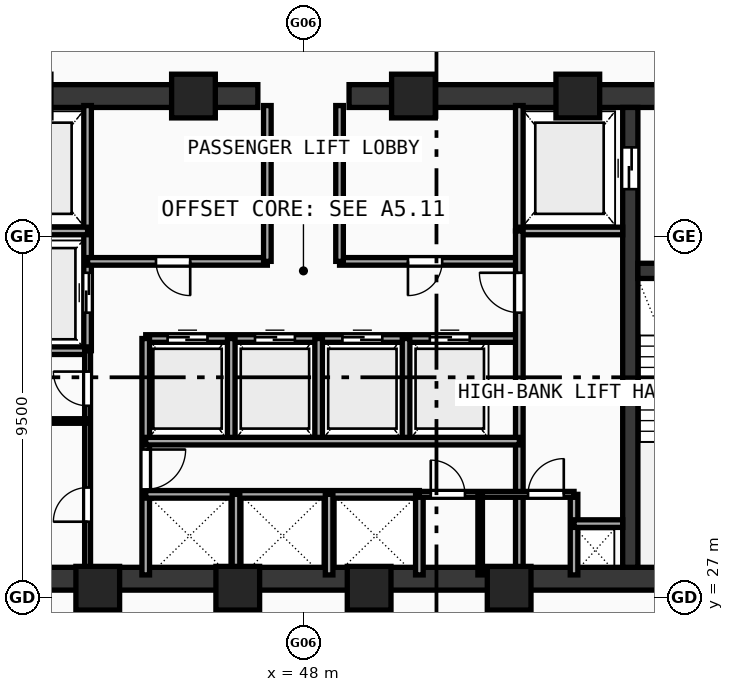
"""IFC4 building model, lengths in metres.
Left out: names, types, materials, properties, quantities, classifications, styles, units other than length and angle.
Written with IfcOpenShell. Run it as: python <this file> out.ifc"""

import sys

from ifc_helpers import new_model, si_unit, direction, frame, frame_2d, origin, origin_with_axes, origin_2d, place, context, subcontext, project, spatial, rectangle, hollow_rectangle, extrude, source, transform, mapped, element, fill, save


model = new_model("IFC4")
c1 = context("Model", 3, precision=1e-05, world=origin(), true_north=direction((0.0, 1.0)))
c2 = subcontext(c1, "Body", "Model", "MODEL_VIEW")
j1 = project(units=[si_unit("LENGTHUNIT", "METRE"), si_unit("PLANEANGLEUNIT", "RADIAN")], contexts=[c1])
p1 = place(None, origin())
s1 = spatial("IfcSite", under=j1, at=p1, CompositionType="ELEMENT")
p2 = place(p1, origin())
s2 = spatial("IfcBuilding", under=s1, at=p2, CompositionType="ELEMENT")
p3 = place(p2, frame((0.0, 0.0, 155.59)))
s3 = spatial("IfcBuildingStorey", under=s2, at=p3, CompositionType="ELEMENT", Elevation=155.59)
p4 = place(p3, frame((35.5, 27.5, 0.0), z_axis=(0.0, 0.0, 1.0), x_axis=(1.0, 0.0, 0.0)))
e1 = element("IfcWall", 1, at=p4, inside=s3, PredefinedType="SHEAR", context=c2, shape_type="SweptSolid", body=[
    extrude(rectangle(XDim=25.0, YDim=0.6, at=frame_2d((12.5, 0.0))), origin(), (0.0, 0.0, 1.0), 3.42),
])
p5 = place(p3, frame((35.5, 40.2, 0.0), z_axis=(0.0, 0.0, 1.0), x_axis=(1.0, 0.0, 0.0)))
e2 = element("IfcWall", 2, at=p5, inside=s3, PredefinedType="SHEAR", context=c2, shape_type="SweptSolid", body=[
    extrude(rectangle(XDim=11.3, YDim=0.6, at=frame_2d((5.65, 0.0))), origin(), (0.0, 0.0, 1.0), 3.42),
])
p6 = place(p5, frame((1.65, 0.0, 0.0)))
e3 = element("IfcOpeningElement", 3, at=p6, cuts=e2, PredefinedType="OPENING", context=c2, shape_type="SweptSolid", body=[
    extrude(rectangle(XDim=1.05, YDim=2.1, at=frame_2d((0.525, 1.05))), frame((0.0, 0.31, 0.0), z_axis=(0.0, -1.0, 0.0), x_axis=(1.0, 0.0, 0.0)), (0.0, 0.0, 1.0), 0.62),
])
p7 = place(p3, frame((49.2, 40.2, 0.0), z_axis=(0.0, 0.0, 1.0), x_axis=(1.0, 0.0, 0.0)))
e4 = element("IfcWall", 4, at=p7, inside=s3, PredefinedType="SHEAR", context=c2, shape_type="SweptSolid", body=[
    extrude(rectangle(XDim=11.3, YDim=0.6, at=frame_2d((5.65, 0.0))), origin(), (0.0, 0.0, 1.0), 3.42),
])
p8 = place(p7, frame((8.6, 0.0, 0.0)))
e5 = element("IfcOpeningElement", 5, at=p8, cuts=e4, PredefinedType="OPENING", context=c2, shape_type="SweptSolid", body=[
    extrude(rectangle(XDim=1.05, YDim=2.1, at=frame_2d((0.525, 1.05))), frame((0.0, 0.31, 0.0), z_axis=(0.0, -1.0, 0.0), x_axis=(1.0, 0.0, 0.0)), (0.0, 0.0, 1.0), 0.62),
])
p9 = place(p3, frame((56.6, 27.8, 0.0), z_axis=(0.0, 0.0, 1.0), x_axis=(0.0, 1.0, 0.0)))
e6 = element("IfcWall", 6, at=p9, inside=s3, PredefinedType="SHEAR", context=c2, shape_type="SweptSolid", body=[
    extrude(rectangle(XDim=12.1, YDim=0.4, at=frame_2d((6.05, 0.0))), origin(), (0.0, 0.0, 1.0), 3.42),
])
p10 = place(p9, frame((9.95, 0.0, 0.0)))
e7 = element("IfcOpeningElement", 7, at=p10, cuts=e6, PredefinedType="OPENING", context=c2, shape_type="SweptSolid", body=[
    extrude(rectangle(XDim=1.1, YDim=2.1, at=frame_2d((0.55, 1.05))), frame((0.0, 0.21, 0.0), z_axis=(0.0, -1.0, 0.0), x_axis=(1.0, 0.0, 0.0)), (0.0, 0.0, 1.0), 0.42),
])
p11 = place(p3, frame((56.8, 35.6, 0.0), z_axis=(0.0, 0.0, 1.0), x_axis=(1.0, 0.0, 0.0)))
e8 = element("IfcWall", 8, at=p11, inside=s3, PredefinedType="SHEAR", context=c2, shape_type="SweptSolid", body=[
    extrude(rectangle(XDim=3.1, YDim=0.4, at=frame_2d((1.55, 0.0))), origin(), (0.0, 0.0, 1.0), 3.42),
])
p12 = place(p11, frame((1.02, 0.0, 0.0)))
e9 = element("IfcOpeningElement", 9, at=p12, cuts=e8, PredefinedType="OPENING", context=c2, shape_type="SweptSolid", body=[
    extrude(rectangle(XDim=1.05, YDim=2.1, at=frame_2d((0.525, 1.05))), frame((0.0, 0.21, 0.0), z_axis=(0.0, -1.0, 0.0), x_axis=(1.0, 0.0, 0.0)), (0.0, 0.0, 1.0), 0.42),
])
m1 = source(origin(), c2, "Body", "SweptSolid", [
    extrude(hollow_rectangle(XDim=1.15, YDim=1.15, WallThickness=0.048, at=origin_2d()), origin(), (0.0, 0.0, 1.0), 3.68),
])
for number, where, z_axis, x_axis in (
    (10, (42.588, 27.25, -0.26), (0.0, 0.0, 1.0), (1.0, 0.0, 0.0)),
    (11, (46.272, 27.25, -0.26), (0.0, 0.0, 1.0), (1.0, 0.0, 0.0)),
    (12, (49.729, 27.25, -0.26), (0.0, 0.0, 1.0), (1.0, 0.0, 0.0)),
    (13, (53.412, 27.25, -0.26), (0.0, 0.0, 1.0), (1.0, 0.0, 0.0)),
    (14, (55.219, 40.2, -0.26), (0.0, 0.0, 1.0), (1.0, 0.0, 0.0)),
    (15, (50.894, 40.2, -0.26), (0.0, 0.0, 1.0), (1.0, 0.0, 0.0)),
    (16, (45.106, 40.2, -0.26), (0.0, 0.0, 1.0), (1.0, 0.0, 0.0)),
):
    element("IfcColumn", number, at=place(p3, frame(where, z_axis=z_axis, x_axis=x_axis)), inside=s3, PredefinedType="COLUMN", context=c2, shape_type="MappedRepresentation", body=[
        mapped(m1, transform((0.0, 0.0, 0.0), scale=1.0)),
    ])
p13 = place(p3, frame((42.32, 33.5, 0.0), z_axis=(0.0, 0.0, 1.0), x_axis=(0.0, 1.0, 0.0)))
e17 = element("IfcWall", 17, at=p13, inside=s3, PredefinedType="SOLIDWALL", context=c2, shape_type="SweptSolid", body=[
    extrude(rectangle(XDim=6.45, YDim=0.2, at=frame_2d((3.225, 0.0))), origin(), (0.0, 0.0, 1.0), 3.42),
])
p14 = place(p13, frame((1.0, 0.0, 0.0)))
e18 = element("IfcOpeningElement", 18, at=p14, cuts=e17, PredefinedType="OPENING", context=c2, shape_type="SweptSolid", body=[
    extrude(rectangle(XDim=1.05, YDim=2.1, at=frame_2d((0.525, 1.05))), frame((0.0, 0.11, 0.0), z_axis=(0.0, -1.0, 0.0), x_axis=(1.0, 0.0, 0.0)), (0.0, 0.0, 1.0), 0.22),
])
for number, where, z_axis, x_axis in (
    (19, (39.6, 36.65, 0.0), (0.0, 0.0, 1.0), (1.0, 0.0, 0.0)),
    (20, (39.6, 33.5, 0.0), (0.0, 0.0, 1.0), (1.0, 0.0, 0.0)),
):
    element("IfcWall", number, at=place(p3, frame(where, z_axis=z_axis, x_axis=x_axis)), inside=s3, PredefinedType="SOLIDWALL", context=c2, shape_type="SweptSolid", body=[
        extrude(rectangle(XDim=2.72, YDim=0.2, at=frame_2d((1.36, 0.0))), origin(), (0.0, 0.0, 1.0), 3.42),
    ])
p15 = place(p3, frame((53.68, 36.65, 0.0), z_axis=(0.0, 0.0, 1.0), x_axis=(0.0, 1.0, 0.0)))
e21 = element("IfcWall", 21, at=p15, inside=s3, PredefinedType="SOLIDWALL", context=c2, shape_type="SweptSolid", body=[
    extrude(rectangle(XDim=3.3, YDim=0.2, at=frame_2d((1.65, 0.0))), origin(), (0.0, 0.0, 1.0), 3.42),
])
p16 = place(p3, frame((53.68, 36.65, 0.0), z_axis=(0.0, 0.0, 1.0), x_axis=(1.0, 0.0, 0.0)))
e22 = element("IfcWall", 22, at=p16, inside=s3, PredefinedType="SOLIDWALL", context=c2, shape_type="SweptSolid", body=[
    extrude(rectangle(XDim=2.72, YDim=0.2, at=frame_2d((1.36, 0.0))), origin(), (0.0, 0.0, 1.0), 3.42),
])
p17 = place(p3, frame((42.32, 35.85, 0.0), z_axis=(0.0, 0.0, 1.0), x_axis=(1.0, 0.0, 0.0)))
e23 = element("IfcWall", 23, at=p17, inside=s3, PredefinedType="SOLIDWALL", context=c2, shape_type="SweptSolid", body=[
    extrude(rectangle(XDim=4.73, YDim=0.2, at=frame_2d((2.365, 0.0))), origin(), (0.0, 0.0, 1.0), 3.42),
])
p18 = place(p17, frame((1.8, 0.0, 0.0)))
e24 = element("IfcOpeningElement", 24, at=p18, cuts=e23, PredefinedType="OPENING", context=c2, shape_type="SweptSolid", body=[
    extrude(rectangle(XDim=0.9, YDim=2.1, at=frame_2d((0.45, 1.05))), frame((0.0, 0.11, 0.0), z_axis=(0.0, -1.0, 0.0), x_axis=(1.0, 0.0, 0.0)), (0.0, 0.0, 1.0), 0.22),
])
p19 = place(p3, frame((48.95, 35.85, 0.0), z_axis=(0.0, 0.0, 1.0), x_axis=(1.0, 0.0, 0.0)))
e25 = element("IfcWall", 25, at=p19, inside=s3, PredefinedType="SOLIDWALL", context=c2, shape_type="SweptSolid", body=[
    extrude(rectangle(XDim=4.73, YDim=0.2, at=frame_2d((2.365, 0.0))), origin(), (0.0, 0.0, 1.0), 3.42),
])
p20 = place(p19, frame((1.8, 0.0, 0.0)))
e26 = element("IfcOpeningElement", 26, at=p20, cuts=e25, PredefinedType="OPENING", context=c2, shape_type="SweptSolid", body=[
    extrude(rectangle(XDim=0.9, YDim=2.1, at=frame_2d((0.45, 1.05))), frame((0.0, 0.11, 0.0), z_axis=(0.0, -1.0, 0.0), x_axis=(1.0, 0.0, 0.0)), (0.0, 0.0, 1.0), 0.22),
])
for number, where, z_axis, x_axis in (
    (27, (47.05, 35.85, 0.0), (0.0, 0.0, 1.0), (0.0, 1.0, 0.0)),
    (28, (48.95, 35.85, 0.0), (0.0, 0.0, 1.0), (0.0, 1.0, 0.0)),
):
    element("IfcWall", number, at=place(p3, frame(where, z_axis=z_axis, x_axis=x_axis)), inside=s3, PredefinedType="SOLIDWALL", context=c2, shape_type="SweptSolid", body=[
        extrude(rectangle(XDim=4.1, YDim=0.2, at=frame_2d((2.05, 0.0))), origin(), (0.0, 0.0, 1.0), 3.42),
    ])
p21 = place(p3, frame((43.85, 33.82, 0.0), z_axis=(0.0, 0.0, 1.0), x_axis=(1.0, 0.0, 0.0)))
e29 = element("IfcWall", 29, at=p21, inside=s3, PredefinedType="SOLIDWALL", context=c2, shape_type="SweptSolid", body=[
    extrude(rectangle(XDim=9.83, YDim=0.2, at=frame_2d((4.915, 0.0))), origin(), (0.0, 0.0, 1.0), 3.42),
])
p22 = place(p21, frame((0.575, 0.0, 0.0)))
e30 = element("IfcOpeningElement", 30, at=p22, cuts=e29, PredefinedType="OPENING", context=c2, shape_type="SweptSolid", body=[
    extrude(rectangle(XDim=1.05, YDim=2.1, at=frame_2d((0.525, 1.05))), frame((0.0, 0.11, 0.0), z_axis=(0.0, -1.0, 0.0), x_axis=(1.0, 0.0, 0.0)), (0.0, 0.0, 1.0), 0.22),
])
p23 = place(p21, frame((2.875, 0.0, 0.0)))
e31 = element("IfcOpeningElement", 31, at=p23, cuts=e29, PredefinedType="OPENING", context=c2, shape_type="SweptSolid", body=[
    extrude(rectangle(XDim=1.05, YDim=2.1, at=frame_2d((0.525, 1.05))), frame((0.0, 0.11, 0.0), z_axis=(0.0, -1.0, 0.0), x_axis=(1.0, 0.0, 0.0)), (0.0, 0.0, 1.0), 0.22),
])
p24 = place(p21, frame((5.175, 0.0, 0.0)))
e32 = element("IfcOpeningElement", 32, at=p24, cuts=e29, PredefinedType="OPENING", context=c2, shape_type="SweptSolid", body=[
    extrude(rectangle(XDim=1.05, YDim=2.1, at=frame_2d((0.525, 1.05))), frame((0.0, 0.11, 0.0), z_axis=(0.0, -1.0, 0.0), x_axis=(1.0, 0.0, 0.0)), (0.0, 0.0, 1.0), 0.22),
])
p25 = place(p21, frame((7.475, 0.0, 0.0)))
e33 = element("IfcOpeningElement", 33, at=p25, cuts=e29, PredefinedType="OPENING", context=c2, shape_type="SweptSolid", body=[
    extrude(rectangle(XDim=1.05, YDim=2.1, at=frame_2d((0.525, 1.05))), frame((0.0, 0.11, 0.0), z_axis=(0.0, -1.0, 0.0), x_axis=(1.0, 0.0, 0.0)), (0.0, 0.0, 1.0), 0.22),
])
p26 = place(p3, frame((43.85, 27.6, 0.0), z_axis=(0.0, 0.0, 1.0), x_axis=(0.0, 1.0, 0.0)))
e34 = element("IfcWall", 34, at=p26, inside=s3, PredefinedType="SOLIDWALL", context=c2, shape_type="SweptSolid", body=[
    extrude(rectangle(XDim=6.22, YDim=0.2, at=frame_2d((3.11, 0.0))), origin(), (0.0, 0.0, 1.0), 3.42),
])
p27 = place(p26, frame((2.25, 0.0, 0.0)))
e35 = element("IfcOpeningElement", 35, at=p27, cuts=e34, PredefinedType="OPENING", context=c2, shape_type="SweptSolid", body=[
    extrude(rectangle(XDim=1.05, YDim=2.1, at=frame_2d((0.525, 1.05))), frame((0.0, 0.11, 0.0), z_axis=(0.0, -1.0, 0.0), x_axis=(1.0, 0.0, 0.0)), (0.0, 0.0, 1.0), 0.22),
])
p28 = place(p3, frame((53.68, 27.6, 0.0), z_axis=(0.0, 0.0, 1.0), x_axis=(0.0, 1.0, 0.0)))
e36 = element("IfcWall", 36, at=p28, inside=s3, PredefinedType="SOLIDWALL", context=c2, shape_type="SweptSolid", body=[
    extrude(rectangle(XDim=9.05, YDim=0.2, at=frame_2d((4.525, 0.0))), origin(), (0.0, 0.0, 1.0), 3.42),
])
p29 = place(p28, frame((6.9, 0.0, 0.0)))
e37 = element("IfcOpeningElement", 37, at=p29, cuts=e36, PredefinedType="OPENING", context=c2, shape_type="SweptSolid", body=[
    extrude(rectangle(XDim=1.05, YDim=2.1, at=frame_2d((0.525, 1.05))), frame((0.0, 0.11, 0.0), z_axis=(0.0, -1.0, 0.0), x_axis=(1.0, 0.0, 0.0)), (0.0, 0.0, 1.0), 0.22),
])
for number, where, z_axis, x_axis in (
    (38, (46.1, 31.12, 0.0), (0.0, 0.0, 1.0), (0.0, 1.0, 0.0)),
    (39, (48.4, 31.12, 0.0), (0.0, 0.0, 1.0), (0.0, 1.0, 0.0)),
    (40, (50.7, 31.12, 0.0), (0.0, 0.0, 1.0), (0.0, 1.0, 0.0)),
):
    element("IfcWall", number, at=place(p3, frame(where, z_axis=z_axis, x_axis=x_axis)), inside=s3, PredefinedType="SOLIDWALL", context=c2, shape_type="SweptSolid", body=[
        extrude(rectangle(XDim=2.7, YDim=0.2, at=frame_2d((1.35, 0.0))), origin(), (0.0, 0.0, 1.0), 3.42),
    ])
p30 = place(p3, frame((43.85, 29.72, 0.0), z_axis=(0.0, 0.0, 1.0), x_axis=(1.0, 0.0, 0.0)))
e41 = element("IfcWall", 41, at=p30, inside=s3, PredefinedType="SOLIDWALL", context=c2, shape_type="SweptSolid", body=[
    extrude(rectangle(XDim=7.2, YDim=0.2, at=frame_2d((3.6, 0.0))), origin(), (0.0, 0.0, 1.0), 3.42),
])
p31 = place(p3, frame((51.05, 27.6, 0.0), z_axis=(0.0, 0.0, 1.0), x_axis=(0.0, 1.0, 0.0)))
e42 = element("IfcWall", 42, at=p31, inside=s3, PredefinedType="SOLIDWALL", context=c2, shape_type="SweptSolid", body=[
    extrude(rectangle(XDim=2.12, YDim=0.2, at=frame_2d((1.06, 0.0))), origin(), (0.0, 0.0, 1.0), 3.42),
])
p32 = place(p3, frame((43.85, 31.12, 0.0), z_axis=(0.0, 0.0, 1.0), x_axis=(1.0, 0.0, 0.0)))
e43 = element("IfcWall", 43, at=p32, inside=s3, PredefinedType="SOLIDWALL", context=c2, shape_type="SweptSolid", body=[
    extrude(rectangle(XDim=9.83, YDim=0.2, at=frame_2d((4.915, 0.0))), origin(), (0.0, 0.0, 1.0), 3.42),
])
for number, where, z_axis, x_axis in (
    (44, (46.225, 27.6, 0.0), (0.0, 0.0, 1.0), (0.0, 1.0, 0.0)),
    (45, (48.675, 27.6, 0.0), (0.0, 0.0, 1.0), (0.0, 1.0, 0.0)),
    (46, (55.12, 27.6, 0.0), (0.0, 0.0, 1.0), (0.0, 1.0, 0.0)),
):
    element("IfcWall", number, at=place(p3, frame(where, z_axis=z_axis, x_axis=x_axis)), inside=s3, PredefinedType="SOLIDWALL", context=c2, shape_type="SweptSolid", body=[
        extrude(rectangle(XDim=2.12, YDim=0.2, at=frame_2d((1.06, 0.0))), origin(), (0.0, 0.0, 1.0), 3.42),
    ])
p33 = place(p3, frame((55.12, 28.95, 0.0), z_axis=(0.0, 0.0, 1.0), x_axis=(1.0, 0.0, 0.0)))
e47 = element("IfcWall", 47, at=p33, inside=s3, PredefinedType="SOLIDWALL", context=c2, shape_type="SweptSolid", body=[
    extrude(rectangle(XDim=1.28, YDim=0.2, at=frame_2d((0.64, 0.0))), origin(), (0.0, 0.0, 1.0), 3.42),
])
p34 = place(p3, frame((42.32, 27.6, 0.0), z_axis=(0.0, 0.0, 1.0), x_axis=(0.0, 1.0, 0.0)))
e48 = element("IfcWall", 48, at=p34, inside=s3, PredefinedType="PARTITIONING", context=c2, shape_type="SweptSolid", body=[
    extrude(rectangle(XDim=5.9, YDim=0.155, at=frame_2d((2.95, 0.0))), origin(), (0.0, 0.0, 1.0), 3.42),
])
p35 = place(p34, frame((1.4, 0.0, 0.0)))
e49 = element("IfcOpeningElement", 49, at=p35, cuts=e48, PredefinedType="OPENING", context=c2, shape_type="SweptSolid", body=[
    extrude(rectangle(XDim=0.9, YDim=2.1, at=frame_2d((0.45, 1.05))), frame((0.0, 0.087, 0.0), z_axis=(0.0, -1.0, 0.0), x_axis=(1.0, 0.0, 0.0)), (0.0, 0.0, 1.0), 0.175),
])
p36 = place(p34, frame((4.45, 0.0, 0.0)))
e50 = element("IfcOpeningElement", 50, at=p36, cuts=e48, PredefinedType="OPENING", context=c2, shape_type="SweptSolid", body=[
    extrude(rectangle(XDim=0.9, YDim=2.1, at=frame_2d((0.45, 1.05))), frame((0.0, 0.087, 0.0), z_axis=(0.0, -1.0, 0.0), x_axis=(1.0, 0.0, 0.0)), (0.0, 0.0, 1.0), 0.175),
])
p37 = place(p3, frame((51.05, 29.72, 0.0), z_axis=(0.0, 0.0, 1.0), x_axis=(1.0, 0.0, 0.0)))
e51 = element("IfcWall", 51, at=p37, inside=s3, PredefinedType="PARTITIONING", context=c2, shape_type="SweptSolid", body=[
    extrude(rectangle(XDim=4.07, YDim=0.155, at=frame_2d((2.035, 0.0))), origin(), (0.0, 0.0, 1.0), 3.42),
])
p38 = place(p37, frame((0.3, 0.0, 0.0)))
e52 = element("IfcOpeningElement", 52, at=p38, cuts=e51, PredefinedType="OPENING", context=c2, shape_type="SweptSolid", body=[
    extrude(rectangle(XDim=0.9, YDim=2.1, at=frame_2d((0.45, 1.05))), frame((0.0, 0.087, 0.0), z_axis=(0.0, -1.0, 0.0), x_axis=(1.0, 0.0, 0.0)), (0.0, 0.0, 1.0), 0.175),
])
p39 = place(p37, frame((2.86, 0.0, 0.0)))
e53 = element("IfcOpeningElement", 53, at=p39, cuts=e51, PredefinedType="OPENING", context=c2, shape_type="SweptSolid", body=[
    extrude(rectangle(XDim=0.94, YDim=2.1, at=frame_2d((0.47, 1.05))), frame((0.0, 0.087, 0.0), z_axis=(0.0, -1.0, 0.0), x_axis=(1.0, 0.0, 0.0)), (0.0, 0.0, 1.0), 0.175),
])
p40 = place(p3, frame((39.6, 31.65, 0.0), z_axis=(0.0, 0.0, 1.0), x_axis=(1.0, 0.0, 0.0)))
e54 = element("IfcWall", 54, at=p40, inside=s3, PredefinedType="PARTITIONING", context=c2, shape_type="SweptSolid", body=[
    extrude(rectangle(XDim=2.72, YDim=0.12, at=frame_2d((1.36, 0.0))), origin(), (0.0, 0.0, 1.0), 3.42),
])
p41 = place(p3, frame((52.65, 27.6, 0.0), z_axis=(0.0, 0.0, 1.0), x_axis=(0.0, 1.0, 0.0)))
e55 = element("IfcWall", 55, at=p41, inside=s3, PredefinedType="PARTITIONING", context=c2, shape_type="SweptSolid", body=[
    extrude(rectangle(XDim=2.12, YDim=0.12, at=frame_2d((1.06, 0.0))), origin(), (0.0, 0.0, 1.0), 3.42),
])
m2 = source(origin(), c2, "Body", "SweptSolid", [
    extrude(rectangle(XDim=1.1, YDim=2.1, at=frame_2d((0.55, 1.05))), frame((0.0, 0.025, 0.0), z_axis=(0.0, -1.0, 0.0), x_axis=(1.0, 0.0, 0.0)), (0.0, 0.0, 1.0), 0.05),
])
p42 = place(p10, origin_with_axes())
e56 = element("IfcDoor", 56, at=p42, inside=s3, OperationType="DOUBLE_DOOR_SLIDING", PredefinedType="DOOR", context=c2, shape_type="MappedRepresentation", body=[
    mapped(m2, transform((0.0, 0.0, 0.0), scale=1.0)),
])
fill(e7, e56)
m3 = source(origin(), c2, "Body", "SweptSolid", [
    extrude(rectangle(XDim=1.05, YDim=2.1, at=frame_2d((0.525, 1.05))), frame((0.0, 0.025, 0.0), z_axis=(0.0, -1.0, 0.0), x_axis=(1.0, 0.0, 0.0)), (0.0, 0.0, 1.0), 0.05),
])
p43 = place(p14, origin_with_axes())
e57 = element("IfcDoor", 57, at=p43, inside=s3, OperationType="DOUBLE_DOOR_SLIDING", PredefinedType="DOOR", context=c2, shape_type="MappedRepresentation", body=[
    mapped(m3, transform((0.0, 0.0, 0.0), scale=1.0)),
])
fill(e18, e57)
m4 = source(origin(), c2, "Body", "SweptSolid", [
    extrude(rectangle(XDim=0.9, YDim=2.1, at=frame_2d((0.45, 1.05))), frame((0.0, 0.025, 0.0), z_axis=(0.0, -1.0, 0.0), x_axis=(1.0, 0.0, 0.0)), (0.0, 0.0, 1.0), 0.05),
])
p44 = place(p18, frame((0.9, 0.0, 0.0), z_axis=(0.0, 0.0, 1.0), x_axis=(-1.0, 0.0, 0.0)))
e58 = element("IfcDoor", 58, at=p44, inside=s3, OperationType="SINGLE_SWING_LEFT", PredefinedType="DOOR", context=c2, shape_type="MappedRepresentation", body=[
    mapped(m4, transform((0.0, 0.0, 0.0), scale=1.0)),
])
fill(e24, e58)
p45 = place(p20, frame((0.9, 0.0, 0.0), z_axis=(0.0, 0.0, 1.0), x_axis=(-1.0, 0.0, 0.0)))
e59 = element("IfcDoor", 59, at=p45, inside=s3, OperationType="SINGLE_SWING_RIGHT", PredefinedType="DOOR", context=c2, shape_type="MappedRepresentation", body=[
    mapped(m4, transform((0.0, 0.0, 0.0), scale=1.0)),
])
fill(e26, e59)
p46 = place(p22, origin_with_axes())
e60 = element("IfcDoor", 60, at=p46, inside=s3, OperationType="DOUBLE_DOOR_SLIDING", PredefinedType="DOOR", context=c2, shape_type="MappedRepresentation", body=[
    mapped(m3, transform((0.0, 0.0, 0.0), scale=1.0)),
])
fill(e30, e60)
p47 = place(p23, origin_with_axes())
e61 = element("IfcDoor", 61, at=p47, inside=s3, OperationType="DOUBLE_DOOR_SLIDING", PredefinedType="DOOR", context=c2, shape_type="MappedRepresentation", body=[
    mapped(m3, transform((0.0, 0.0, 0.0), scale=1.0)),
])
fill(e31, e61)
p48 = place(p24, origin_with_axes())
e62 = element("IfcDoor", 62, at=p48, inside=s3, OperationType="DOUBLE_DOOR_SLIDING", PredefinedType="DOOR", context=c2, shape_type="MappedRepresentation", body=[
    mapped(m3, transform((0.0, 0.0, 0.0), scale=1.0)),
])
fill(e32, e62)
p49 = place(p25, origin_with_axes())
e63 = element("IfcDoor", 63, at=p49, inside=s3, OperationType="DOUBLE_DOOR_SLIDING", PredefinedType="DOOR", context=c2, shape_type="MappedRepresentation", body=[
    mapped(m3, transform((0.0, 0.0, 0.0), scale=1.0)),
])
fill(e33, e63)
p50 = place(p27, frame((1.05, 0.0, 0.0), z_axis=(0.0, 0.0, 1.0), x_axis=(-1.0, 0.0, 0.0)))
e64 = element("IfcDoor", 64, at=p50, inside=s3, OperationType="SINGLE_SWING_LEFT", PredefinedType="DOOR", context=c2, shape_type="MappedRepresentation", body=[
    mapped(m3, transform((0.0, 0.0, 0.0), scale=1.0)),
])
fill(e35, e64)
p51 = place(p29, origin_with_axes())
e65 = element("IfcDoor", 65, at=p51, inside=s3, OperationType="SINGLE_SWING_RIGHT", PredefinedType="DOOR", context=c2, shape_type="MappedRepresentation", body=[
    mapped(m3, transform((0.0, 0.0, 0.0), scale=1.0)),
])
fill(e37, e65)
p52 = place(p35, origin_with_axes())
e66 = element("IfcDoor", 66, at=p52, inside=s3, OperationType="SINGLE_SWING_LEFT", PredefinedType="DOOR", context=c2, shape_type="MappedRepresentation", body=[
    mapped(m4, transform((0.0, 0.0, 0.0), scale=1.0)),
])
fill(e49, e66)
p53 = place(p36, origin_with_axes())
e67 = element("IfcDoor", 67, at=p53, inside=s3, OperationType="SINGLE_SWING_RIGHT", PredefinedType="DOOR", context=c2, shape_type="MappedRepresentation", body=[
    mapped(m4, transform((0.0, 0.0, 0.0), scale=1.0)),
])
fill(e50, e67)
p54 = place(p38, origin_with_axes())
e68 = element("IfcDoor", 68, at=p54, inside=s3, OperationType="SINGLE_SWING_LEFT", PredefinedType="DOOR", context=c2, shape_type="MappedRepresentation", body=[
    mapped(m4, transform((0.0, 0.0, 0.0), scale=1.0)),
])
fill(e52, e68)
m5 = source(origin(), c2, "Body", "SweptSolid", [
    extrude(rectangle(XDim=0.94, YDim=2.1, at=frame_2d((0.47, 1.05))), frame((0.0, 0.025, 0.0), z_axis=(0.0, -1.0, 0.0), x_axis=(1.0, 0.0, 0.0)), (0.0, 0.0, 1.0), 0.05),
])
p55 = place(p39, origin_with_axes())
e69 = element("IfcDoor", 69, at=p55, inside=s3, OperationType="SINGLE_SWING_RIGHT", PredefinedType="DOOR", context=c2, shape_type="MappedRepresentation", body=[
    mapped(m5, transform((0.0, 0.0, 0.0), scale=1.0)),
])
fill(e53, e69)
save(model, sys.argv[1])
